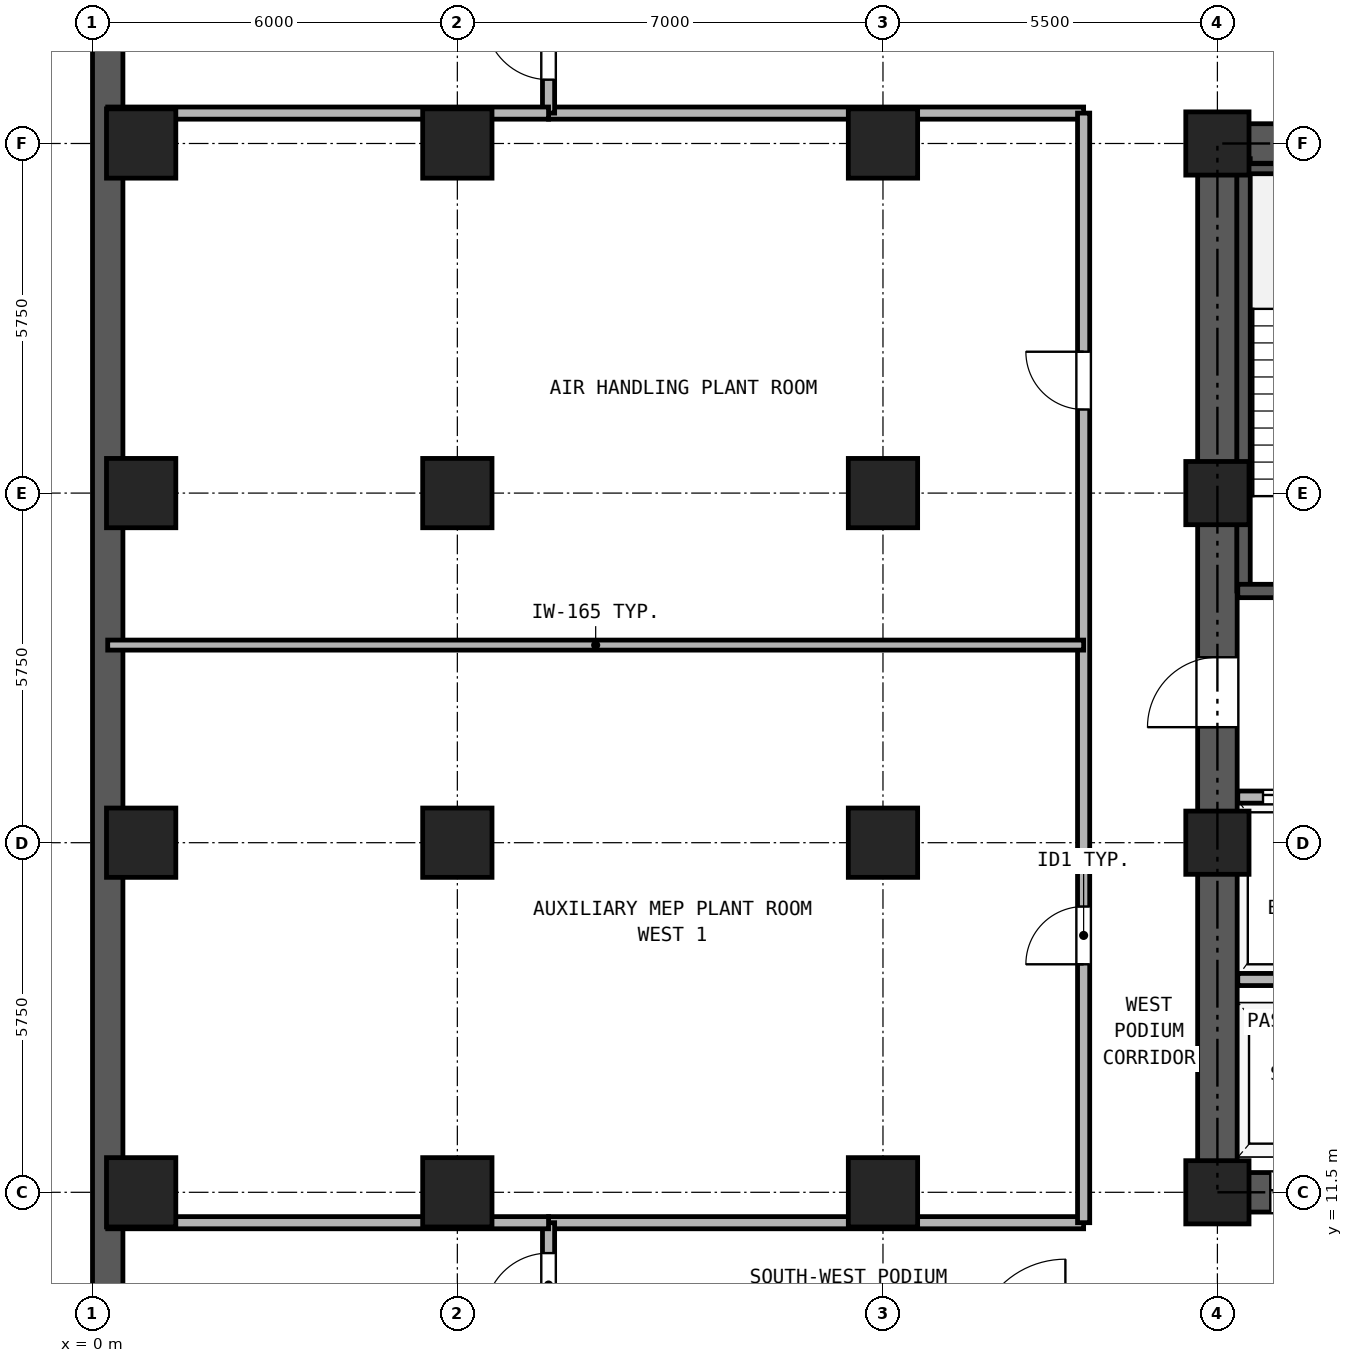
"""IFC4 building model, lengths in metres.
Left out: names, types, materials, properties, quantities, classifications, styles, units other than length and angle.
Written with IfcOpenShell. Run it as: python <this file> out.ifc"""

import sys

from ifc_helpers import new_model, si_unit, direction, frame, frame_2d, origin, origin_2d, place, context, subcontext, project, spatial, rectangle, hollow_rectangle, extrude, source, transform, mapped, element, fill, save


model = new_model("IFC4")
c1 = context("Model", 3, precision=1e-05, world=origin(), true_north=direction((0.0, 1.0)))
c2 = subcontext(c1, "Body", "Model", "MODEL_VIEW")
j1 = project(units=[si_unit("LENGTHUNIT", "METRE"), si_unit("PLANEANGLEUNIT", "RADIAN")], contexts=[c1])
p1 = place(None, origin())
s1 = spatial("IfcSite", under=j1, at=p1, CompositionType="ELEMENT")
p2 = place(p1, origin())
s2 = spatial("IfcBuilding", under=s1, at=p2, CompositionType="ELEMENT")
p3 = place(p2, frame((0.0, 0.0, -8.4)))
s3 = spatial("IfcBuildingStorey", under=s2, at=p3, CompositionType="ELEMENT", Elevation=-8.4)
m1 = source(origin(), c2, "Body", "SweptSolid", [
    extrude(hollow_rectangle(XDim=1.14, YDim=1.14, WallThickness=0.07, at=origin_2d()), origin(), (0.0, 0.0, 1.0), 3.88),
])
for number, where, z_axis, x_axis in (
    (1, (0.8, 11.5, 0.0), (0.0, 0.0, 1.0), (1.0, 0.0, 0.0)),
    (2, (0.8, 17.25, 0.0), (0.0, 0.0, 1.0), (1.0, 0.0, 0.0)),
    (3, (0.8, 23.0, 0.0), (0.0, 0.0, 1.0), (1.0, 0.0, 0.0)),
    (4, (0.8, 28.75, 0.0), (0.0, 0.0, 1.0), (1.0, 0.0, 0.0)),
    (5, (6.0, 11.5, 0.0), (0.0, 0.0, 1.0), (1.0, 0.0, 0.0)),
    (6, (6.0, 17.25, 0.0), (0.0, 0.0, 1.0), (1.0, 0.0, 0.0)),
    (7, (6.0, 23.0, 0.0), (0.0, 0.0, 1.0), (1.0, 0.0, 0.0)),
    (8, (6.0, 28.75, 0.0), (0.0, 0.0, 1.0), (1.0, 0.0, 0.0)),
    (9, (13.0, 11.5, 0.0), (0.0, 0.0, 1.0), (1.0, 0.0, 0.0)),
    (10, (13.0, 17.25, 0.0), (0.0, 0.0, 1.0), (1.0, 0.0, 0.0)),
    (11, (13.0, 23.0, 0.0), (0.0, 0.0, 1.0), (1.0, 0.0, 0.0)),
    (12, (13.0, 28.75, 0.0), (0.0, 0.0, 1.0), (1.0, 0.0, 0.0)),
):
    element("IfcColumn", number, at=place(p3, frame(where, z_axis=z_axis, x_axis=x_axis)), inside=s3, PredefinedType="COLUMN", context=c2, shape_type="MappedRepresentation", body=[
        mapped(m1, transform((0.0, 0.0, 0.0), x_axis=(1.0, 0.0, 0.0), y_axis=(0.0, 1.0, 0.0), z_axis=(0.0, 0.0, 1.0), scale=1.0)),
    ])
m2 = source(origin(), c2, "Body", "SweptSolid", [
    extrude(hollow_rectangle(XDim=1.04, YDim=1.04, WallThickness=0.065, at=origin_2d()), origin(), (0.0, 0.0, 1.0), 3.88),
])
for number, where, z_axis, x_axis in (
    (13, (18.5, 11.5, 0.0), (0.0, 0.0, 1.0), (1.0, 0.0, 0.0)),
    (14, (18.5, 17.25, 0.0), (0.0, 0.0, 1.0), (1.0, 0.0, 0.0)),
    (15, (18.5, 23.0, 0.0), (0.0, 0.0, 1.0), (1.0, 0.0, 0.0)),
    (16, (18.5, 28.75, 0.0), (0.0, 0.0, 1.0), (1.0, 0.0, 0.0)),
):
    element("IfcColumn", number, at=place(p3, frame(where, z_axis=z_axis, x_axis=x_axis)), inside=s3, PredefinedType="COLUMN", context=c2, shape_type="MappedRepresentation", body=[
        mapped(m2, transform((0.0, 0.0, 0.0), x_axis=(1.0, 0.0, 0.0), y_axis=(0.0, 1.0, 0.0), z_axis=(0.0, 0.0, 1.0), scale=1.0)),
    ])
p4 = place(p3, frame((0.25, 36.5, 0.0), z_axis=(0.0, 0.0, 1.0), x_axis=(0.0, -1.0, 0.0)))
e17 = element("IfcWall", 17, at=p4, inside=s3, PredefinedType="USERDEFINED", context=c2, shape_type="SweptSolid", body=[
    extrude(rectangle(XDim=32.5, YDim=0.5, at=frame_2d((16.25, 0.0))), origin(), (0.0, 0.0, 1.0), 3.88),
])
p5 = place(p3, frame((18.175, 11.5, 0.0), z_axis=(0.0, 0.0, 1.0), x_axis=(1.0, 0.0, 0.0)))
e18 = element("IfcWall", 18, at=p5, inside=s3, PredefinedType="SHEAR", context=c2, shape_type="SweptSolid", body=[
    extrude(rectangle(XDim=10.65, YDim=0.65, at=frame_2d((5.325, 0.0))), origin(), (0.0, 0.0, 1.0), 3.88),
])
p6 = place(p5, frame((1.195, 0.0, 0.0)))
e19 = element("IfcOpeningElement", 19, at=p6, cuts=e18, PredefinedType="OPENING", context=c2, shape_type="SweptSolid", body=[
    extrude(rectangle(XDim=1.1, YDim=2.25, at=frame_2d((0.55, 1.125))), frame((0.0, 0.335, 0.0), z_axis=(0.0, -1.0, 0.0), x_axis=(1.0, 0.0, 0.0)), (0.0, 0.0, 1.0), 0.67),
])
p7 = place(p5, frame((3.495, 0.0, 0.0)))
e20 = element("IfcOpeningElement", 20, at=p7, cuts=e18, PredefinedType="OPENING", context=c2, shape_type="SweptSolid", body=[
    extrude(rectangle(XDim=1.1, YDim=2.25, at=frame_2d((0.55, 1.125))), frame((0.0, 0.335, 0.0), z_axis=(0.0, -1.0, 0.0), x_axis=(1.0, 0.0, 0.0)), (0.0, 0.0, 1.0), 0.67),
])
p8 = place(p5, frame((5.925, 0.0, 0.0)))
e21 = element("IfcOpeningElement", 21, at=p8, cuts=e18, PredefinedType="OPENING", context=c2, shape_type="SweptSolid", body=[
    extrude(rectangle(XDim=1.05, YDim=2.15, at=frame_2d((0.525, 1.075))), frame((0.0, 0.335, 0.0), z_axis=(0.0, -1.0, 0.0), x_axis=(1.0, 0.0, 0.0)), (0.0, 0.0, 1.0), 0.67),
])
p9 = place(p5, frame((8.325, 0.0, 0.0)))
e22 = element("IfcOpeningElement", 22, at=p9, cuts=e18, PredefinedType="OPENING", context=c2, shape_type="SweptSolid", body=[
    extrude(rectangle(XDim=1.05, YDim=2.15, at=frame_2d((0.525, 1.075))), frame((0.0, 0.335, 0.0), z_axis=(0.0, -1.0, 0.0), x_axis=(1.0, 0.0, 0.0)), (0.0, 0.0, 1.0), 0.67),
])
p10 = place(p3, frame((18.175, 28.75, 0.0), z_axis=(0.0, 0.0, 1.0), x_axis=(1.0, 0.0, 0.0)))
e23 = element("IfcWall", 23, at=p10, inside=s3, PredefinedType="SHEAR", context=c2, shape_type="SweptSolid", body=[
    extrude(rectangle(XDim=10.65, YDim=0.65, at=frame_2d((5.325, 0.0))), origin(), (0.0, 0.0, 1.0), 3.88),
])
p11 = place(p10, frame((4.205, 0.0, 0.0)))
e24 = element("IfcOpeningElement", 24, at=p11, cuts=e23, PredefinedType="OPENING", context=c2, shape_type="SweptSolid", body=[
    extrude(rectangle(XDim=0.9, YDim=2.05, at=frame_2d((0.45, 1.025))), frame((0.0, 0.335, 0.0), z_axis=(0.0, -1.0, 0.0), x_axis=(1.0, 0.0, 0.0)), (0.0, 0.0, 1.0), 0.67),
])
p12 = place(p10, frame((5.745, 0.0, 0.0)))
e25 = element("IfcOpeningElement", 25, at=p12, cuts=e23, PredefinedType="OPENING", context=c2, shape_type="SweptSolid", body=[
    extrude(rectangle(XDim=0.9, YDim=2.05, at=frame_2d((0.45, 1.025))), frame((0.0, 0.335, 0.0), z_axis=(0.0, -1.0, 0.0), x_axis=(1.0, 0.0, 0.0)), (0.0, 0.0, 1.0), 0.67),
])
p13 = place(p3, frame((18.5, 11.825, 0.0), z_axis=(0.0, 0.0, 1.0), x_axis=(0.0, 1.0, 0.0)))
e26 = element("IfcWall", 26, at=p13, inside=s3, PredefinedType="SHEAR", context=c2, shape_type="SweptSolid", body=[
    extrude(rectangle(XDim=16.6, YDim=0.65, at=frame_2d((8.3, 0.0))), origin(), (0.0, 0.0, 1.0), 3.88),
])
p14 = place(p13, frame((7.325, 0.0, 0.0)))
e27 = element("IfcOpeningElement", 27, at=p14, cuts=e26, PredefinedType="OPENING", context=c2, shape_type="SweptSolid", body=[
    extrude(rectangle(XDim=1.15, YDim=2.2, at=frame_2d((0.575, 1.1))), frame((0.0, 0.335, 0.0), z_axis=(0.0, -1.0, 0.0), x_axis=(1.0, 0.0, 0.0)), (0.0, 0.0, 1.0), 0.67),
])
p15 = place(p3, frame((18.93, 21.39, 0.0), z_axis=(0.0, 0.0, 1.0), x_axis=(0.0, 1.0, 0.0)))
e28 = element("IfcWall", 28, at=p15, inside=s3, PredefinedType="SOLIDWALL", context=c2, shape_type="SweptSolid", body=[
    extrude(rectangle(XDim=7.11, YDim=0.22, at=frame_2d((3.555, 0.0))), origin(), (0.0, 0.0, 1.0), 3.88),
])
p16 = place(p3, frame((18.835, 28.335, 0.0), z_axis=(0.0, 0.0, 1.0), x_axis=(1.0, 0.0, 0.0)))
e29 = element("IfcWall", 29, at=p16, inside=s3, PredefinedType="PARTITIONING", context=c2, shape_type="SweptSolid", body=[
    extrude(rectangle(XDim=3.275, YDim=0.165, at=frame_2d((1.638, 0.0))), origin(), (0.0, 0.0, 1.0), 3.88),
])
p17 = place(p3, frame((18.835, 21.39, 0.0), z_axis=(0.0, 0.0, 1.0), x_axis=(1.0, 0.0, 0.0)))
e30 = element("IfcWall", 30, at=p17, inside=s3, PredefinedType="SOLIDWALL", context=c2, shape_type="SweptSolid", body=[
    extrude(rectangle(XDim=6.295, YDim=0.22, at=frame_2d((3.147, 0.0))), origin(), (0.0, 0.0, 1.0), 3.88),
])
p18 = place(p17, frame((1.015, 0.0, 0.0)))
e31 = element("IfcOpeningElement", 31, at=p18, cuts=e30, PredefinedType="OPENING", context=c2, shape_type="SweptSolid", body=[
    extrude(rectangle(XDim=1.15, YDim=2.2, at=frame_2d((0.575, 1.1))), frame((0.0, 0.12, 0.0), z_axis=(0.0, -1.0, 0.0), x_axis=(1.0, 0.0, 0.0)), (0.0, 0.0, 1.0), 0.24),
])
p19 = place(p17, frame((4.745, 0.0, 0.0)))
e32 = element("IfcOpeningElement", 32, at=p19, cuts=e30, PredefinedType="OPENING", context=c2, shape_type="SweptSolid", body=[
    extrude(rectangle(XDim=1.1, YDim=2.25, at=frame_2d((0.55, 1.125))), frame((0.0, 0.12, 0.0), z_axis=(0.0, -1.0, 0.0), x_axis=(1.0, 0.0, 0.0)), (0.0, 0.0, 1.0), 0.24),
])
p20 = place(p3, frame((18.835, 18.0, 0.0), z_axis=(0.0, 0.0, 1.0), x_axis=(1.0, 0.0, 0.0)))
e33 = element("IfcWall", 33, at=p20, inside=s3, PredefinedType="PARTITIONING", context=c2, shape_type="SweptSolid", body=[
    extrude(rectangle(XDim=9.33, YDim=0.2, at=frame_2d((4.665, 0.0))), origin(), (0.0, 0.0, 1.0), 3.88),
])
p21 = place(p20, frame((0.415, 0.0, 0.0)))
e34 = element("IfcOpeningElement", 34, at=p21, cuts=e33, PredefinedType="OPENING", context=c2, shape_type="SweptSolid", body=[
    extrude(rectangle(XDim=1.3, YDim=2.3, at=frame_2d((0.65, 1.15))), frame((0.0, 0.11, 0.0), z_axis=(0.0, -1.0, 0.0), x_axis=(1.0, 0.0, 0.0)), (0.0, 0.0, 1.0), 0.22),
])
p22 = place(p20, frame((2.515, 0.0, 0.0)))
e35 = element("IfcOpeningElement", 35, at=p22, cuts=e33, PredefinedType="OPENING", context=c2, shape_type="SweptSolid", body=[
    extrude(rectangle(XDim=1.3, YDim=2.3, at=frame_2d((0.65, 1.15))), frame((0.0, 0.11, 0.0), z_axis=(0.0, -1.0, 0.0), x_axis=(1.0, 0.0, 0.0)), (0.0, 0.0, 1.0), 0.22),
])
p23 = place(p20, frame((7.015, 0.0, 0.0)))
e36 = element("IfcOpeningElement", 36, at=p23, cuts=e33, PredefinedType="OPENING", context=c2, shape_type="SweptSolid", body=[
    extrude(rectangle(XDim=1.0, YDim=2.15, at=frame_2d((0.5, 1.075))), frame((0.0, 0.11, 0.0), z_axis=(0.0, -1.0, 0.0), x_axis=(1.0, 0.0, 0.0)), (0.0, 0.0, 1.0), 0.22),
])
p24 = place(p3, frame((18.835, 15.0, 0.0), z_axis=(0.0, 0.0, 1.0), x_axis=(1.0, 0.0, 0.0)))
e37 = element("IfcWall", 37, at=p24, inside=s3, PredefinedType="PARTITIONING", context=c2, shape_type="SweptSolid", body=[
    extrude(rectangle(XDim=9.33, YDim=0.2, at=frame_2d((4.665, 0.0))), origin(), (0.0, 0.0, 1.0), 3.88),
])
for number, where, z_axis, x_axis in (
    (38, (7.5, 11.0, 0.0), (0.0, 0.0, 1.0), (1.0, 0.0, 0.0)),
    (39, (7.5, 29.25, 0.0), (0.0, 0.0, 1.0), (1.0, 0.0, 0.0)),
):
    element("IfcWall", number, at=place(p3, frame(where, z_axis=z_axis, x_axis=x_axis)), inside=s3, PredefinedType="PARTITIONING", context=c2, shape_type="SweptSolid", body=[
        extrude(rectangle(XDim=8.8, YDim=0.2, at=frame_2d((4.4, 0.0))), origin(), (0.0, 0.0, 1.0), 3.88),
    ])
p25 = place(p3, frame((16.3, 11.0, 0.0), z_axis=(0.0, 0.0, 1.0), x_axis=(0.0, 1.0, 0.0)))
e40 = element("IfcWall", 40, at=p25, inside=s3, PredefinedType="PARTITIONING", context=c2, shape_type="SweptSolid", body=[
    extrude(rectangle(XDim=18.25, YDim=0.2, at=frame_2d((9.125, 0.0))), origin(), (0.0, 0.0, 1.0), 3.88),
])
p26 = place(p25, frame((4.25, 0.0, 0.0)))
e41 = element("IfcOpeningElement", 41, at=p26, cuts=e40, PredefinedType="OPENING", context=c2, shape_type="SweptSolid", body=[
    extrude(rectangle(XDim=0.95, YDim=2.15, at=frame_2d((0.475, 1.075))), frame((0.0, 0.11, 0.0), z_axis=(0.0, -1.0, 0.0), x_axis=(1.0, 0.0, 0.0)), (0.0, 0.0, 1.0), 0.22),
])
p27 = place(p25, frame((13.375, 0.0, 0.0)))
e42 = element("IfcOpeningElement", 42, at=p27, cuts=e40, PredefinedType="OPENING", context=c2, shape_type="SweptSolid", body=[
    extrude(rectangle(XDim=0.95, YDim=2.15, at=frame_2d((0.475, 1.075))), frame((0.0, 0.11, 0.0), z_axis=(0.0, -1.0, 0.0), x_axis=(1.0, 0.0, 0.0)), (0.0, 0.0, 1.0), 0.22),
])
p28 = place(p3, frame((7.5, 0.25, 0.0), z_axis=(0.0, 0.0, 1.0), x_axis=(0.0, 1.0, 0.0)))
e43 = element("IfcWall", 43, at=p28, inside=s3, PredefinedType="PARTITIONING", context=c2, shape_type="SweptSolid", body=[
    extrude(rectangle(XDim=10.75, YDim=0.2, at=frame_2d((5.375, 0.0))), origin(), (0.0, 0.0, 1.0), 3.88),
])
p29 = place(p28, frame((9.2, 0.0, 0.0)))
e44 = element("IfcOpeningElement", 44, at=p29, cuts=e43, PredefinedType="OPENING", context=c2, shape_type="SweptSolid", body=[
    extrude(rectangle(XDim=1.05, YDim=2.15, at=frame_2d((0.525, 1.075))), frame((0.0, 0.11, 0.0), z_axis=(0.0, -1.0, 0.0), x_axis=(1.0, 0.0, 0.0)), (0.0, 0.0, 1.0), 0.22),
])
p30 = place(p3, frame((7.5, 29.25, 0.0), z_axis=(0.0, 0.0, 1.0), x_axis=(0.0, 1.0, 0.0)))
e45 = element("IfcWall", 45, at=p30, inside=s3, PredefinedType="PARTITIONING", context=c2, shape_type="SweptSolid", body=[
    extrude(rectangle(XDim=11.0, YDim=0.2, at=frame_2d((5.5, 0.0))), origin(), (0.0, 0.0, 1.0), 3.88),
])
p31 = place(p30, frame((0.55, 0.0, 0.0)))
e46 = element("IfcOpeningElement", 46, at=p31, cuts=e45, PredefinedType="OPENING", context=c2, shape_type="SweptSolid", body=[
    extrude(rectangle(XDim=1.05, YDim=2.15, at=frame_2d((0.525, 1.075))), frame((0.0, 0.11, 0.0), z_axis=(0.0, -1.0, 0.0), x_axis=(1.0, 0.0, 0.0)), (0.0, 0.0, 1.0), 0.22),
])
for number, where, z_axis, x_axis in (
    (47, (0.25, 11.0, 0.0), (0.0, 0.0, 1.0), (1.0, 0.0, 0.0)),
    (48, (0.25, 29.25, 0.0), (0.0, 0.0, 1.0), (1.0, 0.0, 0.0)),
):
    element("IfcWall", number, at=place(p3, frame(where, z_axis=z_axis, x_axis=x_axis)), inside=s3, PredefinedType="PARTITIONING", context=c2, shape_type="SweptSolid", body=[
        extrude(rectangle(XDim=7.25, YDim=0.2, at=frame_2d((3.625, 0.0))), origin(), (0.0, 0.0, 1.0), 3.88),
    ])
p32 = place(p3, frame((0.25, 20.5, 0.0), z_axis=(0.0, 0.0, 1.0), x_axis=(1.0, 0.0, 0.0)))
e49 = element("IfcWall", 49, at=p32, inside=s3, PredefinedType="PARTITIONING", context=c2, shape_type="SweptSolid", body=[
    extrude(rectangle(XDim=16.05, YDim=0.165, at=frame_2d((8.025, 0.0))), origin(), (0.0, 0.0, 1.0), 3.88),
])
p33 = place(p21, origin())
e50 = element("IfcDoor", 50, at=p33, inside=s3, OperationType="DOUBLE_DOOR_SLIDING", PredefinedType="DOOR", context=c2, shape_type="SweptSolid", body=[
    extrude(rectangle(XDim=1.3, YDim=2.3, at=frame_2d((0.65, 1.15))), frame((0.0, 0.025, 0.0), z_axis=(0.0, -1.0, 0.0), x_axis=(1.0, 0.0, 0.0)), (0.0, 0.0, 1.0), 0.05),
])
fill(e34, e50)
p34 = place(p14, frame((1.15, 0.0, 0.0), z_axis=(0.0, 0.0, 1.0), x_axis=(-1.0, 0.0, 0.0)))
e51 = element("IfcDoor", 51, at=p34, inside=s3, OperationType="SINGLE_SWING_LEFT", PredefinedType="DOOR", context=c2, shape_type="SweptSolid", body=[
    extrude(rectangle(XDim=1.15, YDim=2.2, at=frame_2d((0.575, 1.1))), frame((0.0, 0.025, 0.0), z_axis=(0.0, -1.0, 0.0), x_axis=(1.0, 0.0, 0.0)), (0.0, 0.0, 1.0), 0.05),
])
fill(e27, e51)
p35 = place(p6, frame((1.1, 0.0, 0.0), z_axis=(0.0, 0.0, 1.0), x_axis=(-1.0, 0.0, 0.0)))
e52 = element("IfcDoor", 52, at=p35, inside=s3, OperationType="DOUBLE_DOOR_SLIDING", PredefinedType="DOOR", context=c2, shape_type="SweptSolid", body=[
    extrude(rectangle(XDim=1.1, YDim=2.25, at=frame_2d((0.55, 1.125))), frame((0.0, 0.025, 0.0), z_axis=(0.0, -1.0, 0.0), x_axis=(1.0, 0.0, 0.0)), (0.0, 0.0, 1.0), 0.05),
])
fill(e19, e52)
p36 = place(p29, frame((1.05, 0.0, 0.0), z_axis=(0.0, 0.0, 1.0), x_axis=(-1.0, 0.0, 0.0)))
e53 = element("IfcDoor", 53, at=p36, inside=s3, OperationType="SINGLE_SWING_LEFT", PredefinedType="DOOR", context=c2, shape_type="SweptSolid", body=[
    extrude(rectangle(XDim=1.05, YDim=2.15, at=frame_2d((0.525, 1.075))), frame((0.0, 0.025, 0.0), z_axis=(0.0, -1.0, 0.0), x_axis=(1.0, 0.0, 0.0)), (0.0, 0.0, 1.0), 0.05),
])
fill(e44, e53)
p37 = place(p31, frame((1.05, 0.0, 0.0), z_axis=(0.0, 0.0, 1.0), x_axis=(-1.0, 0.0, 0.0)))
e54 = element("IfcDoor", 54, at=p37, inside=s3, OperationType="SINGLE_SWING_RIGHT", PredefinedType="DOOR", context=c2, shape_type="SweptSolid", body=[
    extrude(rectangle(XDim=1.05, YDim=2.15, at=frame_2d((0.525, 1.075))), frame((0.0, 0.025, 0.0), z_axis=(0.0, -1.0, 0.0), x_axis=(1.0, 0.0, 0.0)), (0.0, 0.0, 1.0), 0.05),
])
fill(e46, e54)
p38 = place(p26, frame((0.95, 0.0, 0.0), z_axis=(0.0, 0.0, 1.0), x_axis=(-1.0, 0.0, 0.0)))
e55 = element("IfcDoor", 55, at=p38, inside=s3, OperationType="SINGLE_SWING_LEFT", PredefinedType="DOOR", context=c2, shape_type="SweptSolid", body=[
    extrude(rectangle(XDim=0.95, YDim=2.15, at=frame_2d((0.475, 1.075))), frame((0.0, 0.025, 0.0), z_axis=(0.0, -1.0, 0.0), x_axis=(1.0, 0.0, 0.0)), (0.0, 0.0, 1.0), 0.05),
])
fill(e41, e55)
p39 = place(p27, frame((0.95, 0.0, 0.0), z_axis=(0.0, 0.0, 1.0), x_axis=(-1.0, 0.0, 0.0)))
e56 = element("IfcDoor", 56, at=p39, inside=s3, OperationType="SINGLE_SWING_RIGHT", PredefinedType="DOOR", context=c2, shape_type="SweptSolid", body=[
    extrude(rectangle(XDim=0.95, YDim=2.15, at=frame_2d((0.475, 1.075))), frame((0.0, 0.025, 0.0), z_axis=(0.0, -1.0, 0.0), x_axis=(1.0, 0.0, 0.0)), (0.0, 0.0, 1.0), 0.05),
])
fill(e42, e56)
save(model, sys.argv[1])
